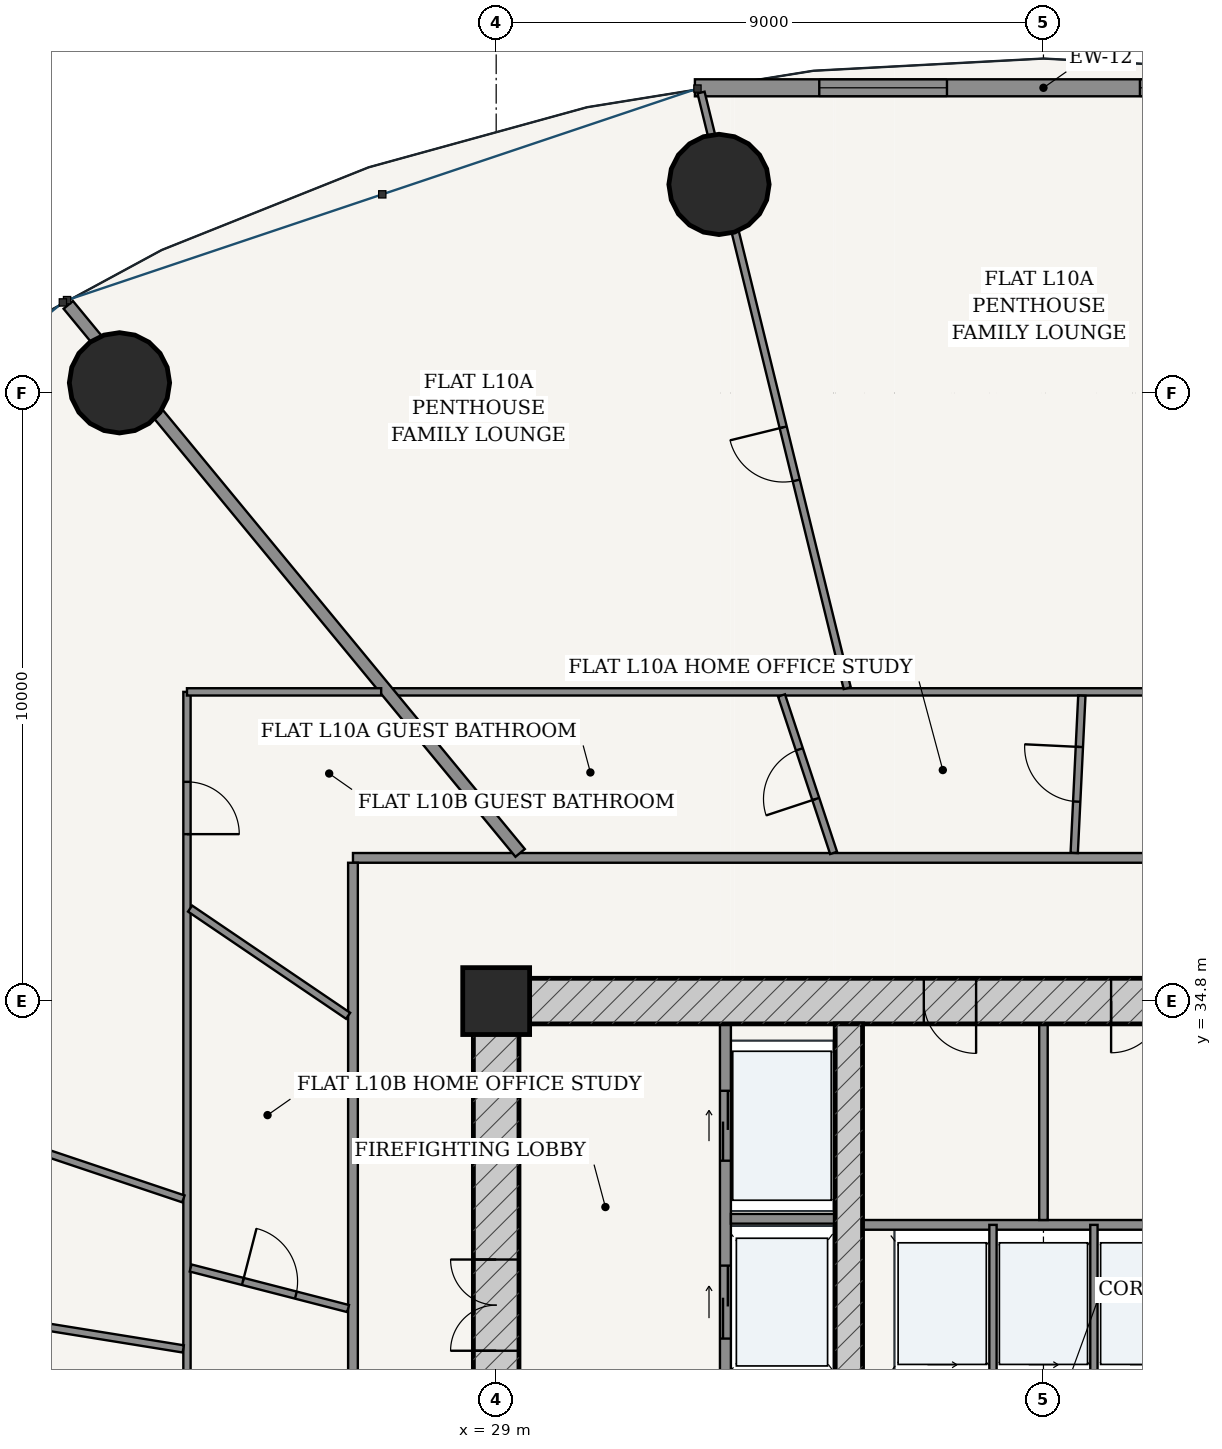
"""IFC4 building model, lengths in metres.
Left out: names, types, materials, properties, quantities, classifications, styles, units other than length and angle.
Written with IfcOpenShell. Run it as: python <this file> out.ifc"""

import sys

from ifc_helpers import new_model, si_unit, direction, frame, frame_2d, origin, origin_2d, place, context, subcontext, project, spatial, rectangle, hollow_circle, extrude, source, transform, mapped, element, fill, save


model = new_model("IFC4")
c1 = context("Model", 3, precision=1e-05, world=origin(), true_north=direction((-0.2419218956, 0.970295726276)))
c2 = subcontext(c1, "Body", "Model", "MODEL_VIEW")
j1 = project(units=[si_unit("LENGTHUNIT", "METRE"), si_unit("PLANEANGLEUNIT", "RADIAN")], contexts=[c1])
p1 = place(None, origin())
s1 = spatial("IfcSite", under=j1, at=p1, CompositionType="ELEMENT")
p2 = place(p1, origin())
s2 = spatial("IfcBuilding", under=s1, at=p2, CompositionType="ELEMENT")
p3 = place(p2, frame((0.0, 0.0, 42.0)))
s3 = spatial("IfcBuildingStorey", under=s2, at=p3, CompositionType="ELEMENT", Elevation=42.0)
p4 = place(p3, frame((29.0, 34.8, 0.0), z_axis=(0.0, 0.0, 1.0), x_axis=(1.0, 0.0, 0.0)))
e1 = element("IfcColumn", 1, at=p4, inside=s3, PredefinedType="COLUMN", context=c2, shape_type="SweptSolid", body=[
    extrude(rectangle(XDim=1.1, YDim=1.1, at=origin_2d()), origin(), (0.0, 0.0, 1.0), 3.6),
])
p5 = place(p3, frame((28.625, 34.8, 0.0), z_axis=(0.0, 0.0, 1.0), x_axis=(1.0, 0.0, 0.0)))
e2 = element("IfcWall", 2, at=p5, inside=s3, PredefinedType="SHEAR", context=c2, shape_type="SweptSolid", body=[
    extrude(rectangle(XDim=18.75, YDim=0.75, at=frame_2d((9.375, 0.0))), origin(), (0.0, 0.0, 1.0), 3.32),
])
p6 = place(p5, frame((7.407, 0.0, 0.0)))
e3 = element("IfcOpeningElement", 3, at=p6, cuts=e2, PredefinedType="OPENING", context=c2, shape_type="SweptSolid", body=[
    extrude(rectangle(XDim=0.86, YDim=2.1, at=frame_2d((0.43, 1.05))), frame((0.0, 0.385, 0.0), z_axis=(0.0, -1.0, 0.0), x_axis=(1.0, 0.0, 0.0)), (0.0, 0.0, 1.0), 0.77),
])
p7 = place(p5, frame((10.488, 0.0, 0.0)))
e4 = element("IfcOpeningElement", 4, at=p7, cuts=e2, PredefinedType="OPENING", context=c2, shape_type="SweptSolid", body=[
    extrude(rectangle(XDim=0.85, YDim=2.1, at=frame_2d((0.425, 1.05))), frame((0.0, 0.385, 0.0), z_axis=(0.0, -1.0, 0.0), x_axis=(1.0, 0.0, 0.0)), (0.0, 0.0, 1.0), 0.77),
])
p8 = place(p3, frame((29.0, 19.175, 0.0), z_axis=(0.0, 0.0, 1.0), x_axis=(0.0, 1.0, 0.0)))
e5 = element("IfcWall", 5, at=p8, inside=s3, PredefinedType="SHEAR", context=c2, shape_type="SweptSolid", body=[
    extrude(rectangle(XDim=15.25, YDim=0.75, at=frame_2d((7.625, 0.0))), origin(), (0.0, 0.0, 1.0), 3.32),
])
p9 = place(p8, frame((9.875, 0.0, 0.0)))
e6 = element("IfcOpeningElement", 6, at=p9, cuts=e5, PredefinedType="OPENING", context=c2, shape_type="SweptSolid", body=[
    extrude(rectangle(XDim=1.5, YDim=2.2, at=frame_2d((0.75, 1.1))), frame((0.0, 0.385, 0.0), z_axis=(0.0, -1.0, 0.0), x_axis=(1.0, 0.0, 0.0)), (0.0, 0.0, 1.0), 0.77),
])
p10 = place(p3, frame((34.8, 19.175, 0.0), z_axis=(0.0, 0.0, 1.0), x_axis=(0.0, 1.0, 0.0)))
e7 = element("IfcWall", 7, at=p10, inside=s3, PredefinedType="SHEAR", context=c2, shape_type="SweptSolid", body=[
    extrude(rectangle(XDim=15.25, YDim=0.45, at=frame_2d((7.625, 0.0))), origin(), (0.0, 0.0, 1.0), 3.32),
])
p11 = place(p10, frame((7.8, 0.0, 0.0)))
e8 = element("IfcOpeningElement", 8, at=p11, cuts=e7, PredefinedType="OPENING", context=c2, shape_type="SweptSolid", body=[
    extrude(rectangle(XDim=1.05, YDim=2.15, at=frame_2d((0.525, 1.075))), frame((0.0, 0.235, 0.0), z_axis=(0.0, -1.0, 0.0), x_axis=(1.0, 0.0, 0.0)), (0.0, 0.0, 1.0), 0.47),
])
for number, where, z_axis, x_axis in (
    (9, (32.664, 48.23, 0.0), (0.0, 0.0, 1.0), (1.0, 0.0, 0.0)),
    (10, (22.805, 44.968, 0.0), (0.0, 0.0, 1.0), (1.0, 0.0, 0.0)),
):
    element("IfcColumn", number, at=place(p3, frame(where, z_axis=z_axis, x_axis=x_axis)), inside=s3, PredefinedType="COLUMN", context=c2, shape_type="SweptSolid", body=[
        extrude(hollow_circle(Radius=0.825, WallThickness=0.05, at=origin_2d()), origin(), (0.0, 0.0, 1.0), 3.6),
    ])
p12 = place(p3, frame((43.732, 49.819, 0.0), z_axis=(0.0, 0.0, 1.0), x_axis=(-1.0, 0.0, 0.0)))
e11 = element("IfcWall", 11, at=p12, inside=s3, PredefinedType="SOLIDWALL", context=c2, shape_type="SweptSolid", body=[
    extrude(rectangle(XDim=11.463, YDim=0.28, at=frame_2d((5.732, 0.0))), origin(), (0.0, 0.0, 1.0), 3.32),
])
p13 = place(p12, frame((2.045, 0.0, 0.85)))
e12 = element("IfcOpeningElement", 12, at=p13, cuts=e11, PredefinedType="OPENING", context=c2, shape_type="SweptSolid", body=[
    extrude(rectangle(XDim=2.1, YDim=1.95, at=frame_2d((1.05, 0.975))), frame((0.0, 0.15, 0.0), z_axis=(0.0, -1.0, 0.0), x_axis=(1.0, 0.0, 0.0)), (0.0, 0.0, 1.0), 0.3),
])
p14 = place(p12, frame((7.318, 0.0, 0.85)))
e13 = element("IfcOpeningElement", 13, at=p14, cuts=e11, PredefinedType="OPENING", context=c2, shape_type="SweptSolid", body=[
    extrude(rectangle(XDim=2.1, YDim=1.95, at=frame_2d((1.05, 0.975))), frame((0.0, 0.15, 0.0), z_axis=(0.0, -1.0, 0.0), x_axis=(1.0, 0.0, 0.0)), (0.0, 0.0, 1.0), 0.3),
])
p15 = place(p3, frame((32.77, 28.52, 0.0), z_axis=(0.0, 0.0, 1.0), x_axis=(0.0, 1.0, 0.0)))
e14 = element("IfcWall", 14, at=p15, inside=s3, PredefinedType="PARTITIONING", context=c2, shape_type="SweptSolid", body=[
    extrude(rectangle(XDim=5.905, YDim=0.18, at=frame_2d((2.953, 0.0))), origin(), (0.0, 0.0, 1.0), 3.32),
])
p16 = place(p15, frame((3.655, 0.0, 0.0)))
e15 = element("IfcOpeningElement", 15, at=p16, cuts=e14, PredefinedType="OPENING", context=c2, shape_type="SweptSolid", body=[
    extrude(rectangle(XDim=1.15, YDim=2.2, at=frame_2d((0.575, 1.1))), frame((0.0, 0.1, 0.0), z_axis=(0.0, -1.0, 0.0), x_axis=(1.0, 0.0, 0.0)), (0.0, 0.0, 1.0), 0.2),
])
p17 = place(p15, frame((0.73, 0.0, 0.0)))
e16 = element("IfcOpeningElement", 16, at=p17, cuts=e14, PredefinedType="OPENING", context=c2, shape_type="SweptSolid", body=[
    extrude(rectangle(XDim=1.2, YDim=2.25, at=frame_2d((0.6, 1.125))), frame((0.0, 0.1, 0.0), z_axis=(0.0, -1.0, 0.0), x_axis=(1.0, 0.0, 0.0)), (0.0, 0.0, 1.0), 0.2),
])
p18 = place(p3, frame((32.86, 31.22, 0.0), z_axis=(0.0, 0.0, 1.0), x_axis=(1.0, 0.0, 0.0)))
e17 = element("IfcWall", 17, at=p18, inside=s3, PredefinedType="PARTITIONING", context=c2, shape_type="SweptSolid", body=[
    extrude(rectangle(XDim=1.715, YDim=0.16, at=frame_2d((0.857, 0.0))), origin(), (0.0, 0.0, 1.0), 3.32),
])
p19 = place(p3, frame((35.025, 31.12, 0.0), z_axis=(0.0, 0.0, 1.0), x_axis=(1.0, 0.0, 0.0)))
e18 = element("IfcWall", 18, at=p19, inside=s3, PredefinedType="PARTITIONING", context=c2, shape_type="SweptSolid", body=[
    extrude(rectangle(XDim=5.95, YDim=0.16, at=frame_2d((2.975, 0.0))), origin(), (0.0, 0.0, 1.0), 3.32),
])
for number, where, z_axis, x_axis in (
    (19, (37.17, 28.56, 0.0), (0.0, 0.0, 1.0), (0.0, 1.0, 0.0)),
    (20, (38.83, 28.56, 0.0), (0.0, 0.0, 1.0), (0.0, 1.0, 0.0)),
):
    element("IfcWall", number, at=place(p3, frame(where, z_axis=z_axis, x_axis=x_axis)), inside=s3, PredefinedType="PARTITIONING", context=c2, shape_type="SweptSolid", body=[
        extrude(rectangle(XDim=2.56, YDim=0.12, at=frame_2d((1.28, 0.0))), origin(), (0.0, 0.0, 1.0), 3.32),
    ])
p20 = place(p3, frame((38.0, 31.2, 0.0), z_axis=(0.0, 0.0, 1.0), x_axis=(0.0, 1.0, 0.0)))
e21 = element("IfcWall", 21, at=p20, inside=s3, PredefinedType="PARTITIONING", context=c2, shape_type="SweptSolid", body=[
    extrude(rectangle(XDim=3.225, YDim=0.14, at=frame_2d((1.613, 0.0))), origin(), (0.0, 0.0, 1.0), 3.32),
])
p21 = place(p3, frame((26.645, 37.155, 0.0), z_axis=(0.0, 0.0, 1.0), x_axis=(1.0, 0.0, 0.0)))
e22 = element("IfcWall", 22, at=p21, inside=s3, PredefinedType="PARTITIONING", context=c2, shape_type="SweptSolid", body=[
    extrude(rectangle(XDim=22.71, YDim=0.16, at=frame_2d((11.355, 0.0))), origin(), (0.0, 0.0, 1.0), 2.688),
])
p22 = place(p3, frame((26.645, 16.525, 0.0), z_axis=(0.0, 0.0, 1.0), x_axis=(0.0, 1.0, 0.0)))
e23 = element("IfcWall", 23, at=p22, inside=s3, PredefinedType="PARTITIONING", context=c2, shape_type="SweptSolid", body=[
    extrude(rectangle(XDim=20.55, YDim=0.16, at=frame_2d((10.275, 0.0))), origin(), (0.0, 0.0, 1.0), 2.688),
])
p23 = place(p22, frame((1.226, 0.0, 0.0)))
e24 = element("IfcOpeningElement", 24, at=p23, cuts=e23, PredefinedType="OPENING", context=c2, shape_type="SweptSolid", body=[
    extrude(rectangle(XDim=0.98, YDim=2.2, at=frame_2d((0.49, 1.1))), frame((0.0, 0.09, 0.0), z_axis=(0.0, -1.0, 0.0), x_axis=(1.0, 0.0, 0.0)), (0.0, 0.0, 1.0), 0.18),
])
p24 = place(p3, frame((27.312, 39.885, 0.0), z_axis=(0.0, 0.0, 1.0), x_axis=(1.0, 0.0, 0.0)))
e25 = element("IfcWall", 25, at=p24, inside=s3, PredefinedType="PARTITIONING", context=c2, shape_type="SweptSolid", body=[
    extrude(rectangle(XDim=24.772, YDim=0.12, at=frame_2d((12.386, 0.0))), origin(), (0.0, 0.0, 1.0), 2.688),
])
p25 = place(p3, frame((34.773, 39.945, 0.0), z_axis=(0.0, 0.0, 1.0), x_axis=(-0.238375747469, 0.97117300365, 0.0)))
e26 = element("IfcWall", 26, at=p25, inside=s3, PredefinedType="PARTITIONING", context=c2, shape_type="SweptSolid", body=[
    extrude(rectangle(XDim=10.086, YDim=0.12, at=frame_2d((5.043, 0.0))), origin(), (0.0, 0.0, 1.0), 2.688),
])
p26 = place(p25, frame((3.518, 0.0, 0.0)))
e27 = element("IfcOpeningElement", 27, at=p26, cuts=e26, PredefinedType="OPENING", context=c2, shape_type="SweptSolid", body=[
    extrude(rectangle(XDim=0.9, YDim=2.15, at=frame_2d((0.45, 1.075))), frame((0.0, 0.07, 0.0), z_axis=(0.0, -1.0, 0.0), x_axis=(1.0, 0.0, 0.0)), (0.0, 0.0, 1.0), 0.14),
])
p27 = place(p3, frame((38.506, 37.237, 0.0), z_axis=(0.0, 0.0, 1.0), x_axis=(0.048376073987, 0.998829192338, 0.0)))
e28 = element("IfcWall", 28, at=p27, inside=s3, PredefinedType="PARTITIONING", context=c2, shape_type="SweptSolid", body=[
    extrude(rectangle(XDim=2.589, YDim=0.12, at=frame_2d((1.294, 0.0))), origin(), (0.0, 0.0, 1.0), 3.32),
])
p28 = place(p27, frame((0.844, 0.0, 0.0)))
e29 = element("IfcOpeningElement", 29, at=p28, cuts=e28, PredefinedType="OPENING", context=c2, shape_type="SweptSolid", body=[
    extrude(rectangle(XDim=0.9, YDim=2.15, at=frame_2d((0.45, 1.075))), frame((0.0, 0.07, 0.0), z_axis=(0.0, -1.0, 0.0), x_axis=(1.0, 0.0, 0.0)), (0.0, 0.0, 1.0), 0.14),
])
p29 = place(p3, frame((34.549, 37.237, 0.0), z_axis=(0.0, 0.0, 1.0), x_axis=(-0.313863409377, 0.949468145992, 0.0)))
e30 = element("IfcWall", 30, at=p29, inside=s3, PredefinedType="PARTITIONING", context=c2, shape_type="SweptSolid", body=[
    extrude(rectangle(XDim=2.727, YDim=0.12, at=frame_2d((1.364, 0.0))), origin(), (0.0, 0.0, 1.0), 3.32),
])
p30 = place(p29, frame((0.934, 0.0, 0.0)))
e31 = element("IfcOpeningElement", 31, at=p30, cuts=e30, PredefinedType="OPENING", context=c2, shape_type="SweptSolid", body=[
    extrude(rectangle(XDim=0.86, YDim=2.15, at=frame_2d((0.43, 1.075))), frame((0.0, 0.07, 0.0), z_axis=(0.0, -1.0, 0.0), x_axis=(1.0, 0.0, 0.0)), (0.0, 0.0, 1.0), 0.14),
])
p31 = place(p3, frame((29.395, 37.237, 0.0), z_axis=(0.0, 0.0, 1.0), x_axis=(-0.636195770442, 0.77152766747, 0.0)))
e32 = element("IfcWall", 32, at=p31, inside=s3, PredefinedType="PARTITIONING", context=c2, shape_type="SweptSolid", body=[
    extrude(rectangle(XDim=11.681, YDim=0.2, at=frame_2d((5.84, 0.0))), origin(), (0.0, 0.0, 1.0), 2.688),
])
p32 = place(p3, frame((23.915, 13.715, 0.0), z_axis=(0.0, 0.0, 1.0), x_axis=(0.0, 1.0, 0.0)))
e33 = element("IfcWall", 33, at=p32, inside=s3, PredefinedType="PARTITIONING", context=c2, shape_type="SweptSolid", body=[
    extrude(rectangle(XDim=26.17, YDim=0.12, at=frame_2d((13.085, 0.0))), origin(), (0.0, 0.0, 1.0), 2.688),
])
p33 = place(p32, frame((1.895, 0.0, 0.0)))
e34 = element("IfcOpeningElement", 34, at=p33, cuts=e33, PredefinedType="OPENING", context=c2, shape_type="SweptSolid", body=[
    extrude(rectangle(XDim=0.9, YDim=2.15, at=frame_2d((0.45, 1.075))), frame((0.0, 0.07, 0.0), z_axis=(0.0, -1.0, 0.0), x_axis=(1.0, 0.0, 0.0)), (0.0, 0.0, 1.0), 0.14),
])
p34 = place(p32, frame((11.498, 0.0, 0.0)))
e35 = element("IfcOpeningElement", 35, at=p34, cuts=e33, PredefinedType="OPENING", context=c2, shape_type="SweptSolid", body=[
    extrude(rectangle(XDim=0.9, YDim=2.15, at=frame_2d((0.45, 1.075))), frame((0.0, 0.07, 0.0), z_axis=(0.0, -1.0, 0.0), x_axis=(1.0, 0.0, 0.0)), (0.0, 0.0, 1.0), 0.14),
])
p35 = place(p32, frame((23.831, 0.0, 0.0)))
e36 = element("IfcOpeningElement", 36, at=p35, cuts=e33, PredefinedType="OPENING", context=c2, shape_type="SweptSolid", body=[
    extrude(rectangle(XDim=0.86, YDim=2.15, at=frame_2d((0.43, 1.075))), frame((0.0, 0.07, 0.0), z_axis=(0.0, -1.0, 0.0), x_axis=(1.0, 0.0, 0.0)), (0.0, 0.0, 1.0), 0.14),
])
p36 = place(p3, frame((23.915, 39.885, 0.0), z_axis=(0.0, 0.0, 1.0), x_axis=(1.0, 0.0, 0.0)))
e37 = element("IfcWall", 37, at=p36, inside=s3, PredefinedType="PARTITIONING", context=c2, shape_type="SweptSolid", body=[
    extrude(rectangle(XDim=3.194, YDim=0.12, at=frame_2d((1.597, 0.0))), origin(), (0.0, 0.0, 1.0), 2.688),
])
p37 = place(p3, frame((23.856, 31.547, 0.0), z_axis=(0.0, 0.0, 1.0), x_axis=(-0.948017487737, 0.318218231634, 0.0)))
e38 = element("IfcWall", 38, at=p37, inside=s3, PredefinedType="PARTITIONING", context=c2, shape_type="SweptSolid", body=[
    extrude(rectangle(XDim=13.279, YDim=0.12, at=frame_2d((6.639, 0.0))), origin(), (0.0, 0.0, 1.0), 2.762),
])
p38 = place(p37, frame((6.189, 0.0, 0.0)))
e39 = element("IfcOpeningElement", 39, at=p38, cuts=e38, PredefinedType="OPENING", context=c2, shape_type="SweptSolid", body=[
    extrude(rectangle(XDim=0.9, YDim=2.15, at=frame_2d((0.45, 1.075))), frame((0.0, 0.07, 0.0), z_axis=(0.0, -1.0, 0.0), x_axis=(1.0, 0.0, 0.0)), (0.0, 0.0, 1.0), 0.14),
])
p39 = place(p3, frame((23.854, 29.08, 0.0), z_axis=(0.0, 0.0, 1.0), x_axis=(-0.987255773689, 0.159141563768, 0.0)))
e40 = element("IfcWall", 40, at=p39, inside=s3, PredefinedType="PARTITIONING", context=c2, shape_type="SweptSolid", body=[
    extrude(rectangle(XDim=14.359, YDim=0.12, at=frame_2d((7.18, 0.0))), origin(), (0.0, 0.0, 1.0), 2.688),
])
p40 = place(p39, frame((5.66, 0.0, 0.0)))
e41 = element("IfcOpeningElement", 41, at=p40, cuts=e40, PredefinedType="OPENING", context=c2, shape_type="SweptSolid", body=[
    extrude(rectangle(XDim=0.9, YDim=2.15, at=frame_2d((0.45, 1.075))), frame((0.0, 0.07, 0.0), z_axis=(0.0, -1.0, 0.0), x_axis=(1.0, 0.0, 0.0)), (0.0, 0.0, 1.0), 0.14),
])
p41 = place(p3, frame((26.565, 34.558, 0.0), z_axis=(0.0, 0.0, 1.0), x_axis=(-0.827501574847, 0.561463394734, 0.0)))
e42 = element("IfcWall", 42, at=p41, inside=s3, PredefinedType="PARTITIONING", context=c2, shape_type="SweptSolid", body=[
    extrude(rectangle(XDim=3.14, YDim=0.12, at=frame_2d((1.57, 0.0))), origin(), (0.0, 0.0, 1.0), 3.32),
])
p42 = place(p3, frame((26.565, 29.744, 0.0), z_axis=(0.0, 0.0, 1.0), x_axis=(-0.968421803088, 0.249317490972, 0.0)))
e43 = element("IfcWall", 43, at=p42, inside=s3, PredefinedType="PARTITIONING", context=c2, shape_type="SweptSolid", body=[
    extrude(rectangle(XDim=2.674, YDim=0.12, at=frame_2d((1.337, 0.0))), origin(), (0.0, 0.0, 1.0), 3.32),
])
p43 = place(p42, frame((0.887, 0.0, 0.0)))
e44 = element("IfcOpeningElement", 44, at=p43, cuts=e43, PredefinedType="OPENING", context=c2, shape_type="SweptSolid", body=[
    extrude(rectangle(XDim=0.9, YDim=2.15, at=frame_2d((0.45, 1.075))), frame((0.0, 0.07, 0.0), z_axis=(0.0, -1.0, 0.0), x_axis=(1.0, 0.0, 0.0)), (0.0, 0.0, 1.0), 0.14),
])
m1 = source(origin(), c2, "Body", "SweptSolid", [
    extrude(rectangle(XDim=2.1, YDim=1.95, at=frame_2d((1.05, 0.975))), frame((0.0, 0.03, 0.0), z_axis=(0.0, -1.0, 0.0), x_axis=(1.0, 0.0, 0.0)), (0.0, 0.0, 1.0), 0.06),
])
p44 = place(p13, origin())
e45 = element("IfcWindow", 45, at=p44, inside=s3, PartitioningType="SINGLE_PANEL", PredefinedType="WINDOW", context=c2, shape_type="MappedRepresentation", body=[
    mapped(m1, transform((0.0, 0.0, 0.0), scale=1.0)),
])
fill(e12, e45)
p45 = place(p14, origin())
e46 = element("IfcWindow", 46, at=p45, inside=s3, PartitioningType="SINGLE_PANEL", PredefinedType="WINDOW", context=c2, shape_type="MappedRepresentation", body=[
    mapped(m1, transform((0.0, 0.0, 0.0), scale=1.0)),
])
fill(e13, e46)
m2 = source(origin(), c2, "Body", "SweptSolid", [
    extrude(rectangle(XDim=1.5, YDim=2.2, at=frame_2d((0.75, 1.1))), frame((0.0, 0.025, 0.0), z_axis=(0.0, -1.0, 0.0), x_axis=(1.0, 0.0, 0.0)), (0.0, 0.0, 1.0), 0.05),
])
p46 = place(p9, origin())
e47 = element("IfcDoor", 47, at=p46, inside=s3, OperationType="DOUBLE_DOOR_SINGLE_SWING", PredefinedType="DOOR", context=c2, shape_type="MappedRepresentation", body=[
    mapped(m2, transform((0.0, 0.0, 0.0), scale=1.0)),
])
fill(e6, e47)
m3 = source(origin(), c2, "Body", "SweptSolid", [
    extrude(rectangle(XDim=0.86, YDim=2.1, at=frame_2d((0.43, 1.05))), frame((0.0, 0.025, 0.0), z_axis=(0.0, -1.0, 0.0), x_axis=(1.0, 0.0, 0.0)), (0.0, 0.0, 1.0), 0.05),
])
p47 = place(p6, frame((0.86, 0.0, 0.0), z_axis=(0.0, 0.0, 1.0), x_axis=(-1.0, 0.0, 0.0)))
e48 = element("IfcDoor", 48, at=p47, inside=s3, OperationType="SINGLE_SWING_LEFT", PredefinedType="DOOR", context=c2, shape_type="MappedRepresentation", body=[
    mapped(m3, transform((0.0, 0.0, 0.0), scale=1.0)),
])
fill(e3, e48)
m4 = source(origin(), c2, "Body", "SweptSolid", [
    extrude(rectangle(XDim=0.85, YDim=2.1, at=frame_2d((0.425, 1.05))), frame((0.0, 0.025, 0.0), z_axis=(0.0, -1.0, 0.0), x_axis=(1.0, 0.0, 0.0)), (0.0, 0.0, 1.0), 0.05),
])
p48 = place(p7, frame((0.85, 0.0, 0.0), z_axis=(0.0, 0.0, 1.0), x_axis=(-1.0, 0.0, 0.0)))
e49 = element("IfcDoor", 49, at=p48, inside=s3, OperationType="SINGLE_SWING_RIGHT", PredefinedType="DOOR", context=c2, shape_type="MappedRepresentation", body=[
    mapped(m4, transform((0.0, 0.0, 0.0), scale=1.0)),
])
fill(e4, e49)
m5 = source(origin(), c2, "Body", "SweptSolid", [
    extrude(rectangle(XDim=1.15, YDim=2.2, at=frame_2d((0.575, 1.1))), frame((0.0, 0.025, 0.0), z_axis=(0.0, -1.0, 0.0), x_axis=(1.0, 0.0, 0.0)), (0.0, 0.0, 1.0), 0.05),
])
p49 = place(p16, origin())
e50 = element("IfcDoor", 50, at=p49, inside=s3, OperationType="DOUBLE_DOOR_SLIDING", PredefinedType="DOOR", context=c2, shape_type="MappedRepresentation", body=[
    mapped(m5, transform((0.0, 0.0, 0.0), scale=1.0)),
])
fill(e15, e50)
m6 = source(origin(), c2, "Body", "SweptSolid", [
    extrude(rectangle(XDim=1.2, YDim=2.25, at=frame_2d((0.6, 1.125))), frame((0.0, 0.025, 0.0), z_axis=(0.0, -1.0, 0.0), x_axis=(1.0, 0.0, 0.0)), (0.0, 0.0, 1.0), 0.05),
])
p50 = place(p17, origin())
e51 = element("IfcDoor", 51, at=p50, inside=s3, OperationType="DOUBLE_DOOR_SLIDING", PredefinedType="DOOR", context=c2, shape_type="MappedRepresentation", body=[
    mapped(m6, transform((0.0, 0.0, 0.0), scale=1.0)),
])
fill(e16, e51)
m7 = source(origin(), c2, "Body", "SweptSolid", [
    extrude(rectangle(XDim=0.9, YDim=2.15, at=frame_2d((0.45, 1.075))), frame((0.0, 0.025, 0.0), z_axis=(0.0, -1.0, 0.0), x_axis=(1.0, 0.0, 0.0)), (0.0, 0.0, 1.0), 0.05),
])
p51 = place(p28, origin())
e52 = element("IfcDoor", 52, at=p51, inside=s3, OperationType="SINGLE_SWING_RIGHT", PredefinedType="DOOR", context=c2, shape_type="MappedRepresentation", body=[
    mapped(m7, transform((0.0, 0.0, 0.0), scale=1.0)),
])
fill(e29, e52)
m8 = source(origin(), c2, "Body", "SweptSolid", [
    extrude(rectangle(XDim=0.86, YDim=2.15, at=frame_2d((0.43, 1.075))), frame((0.0, 0.025, 0.0), z_axis=(0.0, -1.0, 0.0), x_axis=(1.0, 0.0, 0.0)), (0.0, 0.0, 1.0), 0.05),
])
p52 = place(p30, origin())
e53 = element("IfcDoor", 53, at=p52, inside=s3, OperationType="SINGLE_SWING_LEFT", PredefinedType="DOOR", context=c2, shape_type="MappedRepresentation", body=[
    mapped(m8, transform((0.0, 0.0, 0.0), scale=1.0)),
])
fill(e31, e53)
p53 = place(p26, origin())
e54 = element("IfcDoor", 54, at=p53, inside=s3, OperationType="SINGLE_SWING_RIGHT", PredefinedType="DOOR", context=c2, shape_type="MappedRepresentation", body=[
    mapped(m7, transform((0.0, 0.0, 0.0), scale=1.0)),
])
fill(e27, e54)
p54 = place(p43, frame((0.9, 0.0, 0.0), z_axis=(0.0, 0.0, 1.0), x_axis=(-1.0, 0.0, 0.0)))
e55 = element("IfcDoor", 55, at=p54, inside=s3, OperationType="SINGLE_SWING_LEFT", PredefinedType="DOOR", context=c2, shape_type="MappedRepresentation", body=[
    mapped(m7, transform((0.0, 0.0, 0.0), scale=1.0)),
])
fill(e44, e55)
p55 = place(p35, frame((0.86, 0.0, 0.0), z_axis=(0.0, 0.0, 1.0), x_axis=(-1.0, 0.0, 0.0)))
e56 = element("IfcDoor", 56, at=p55, inside=s3, OperationType="SINGLE_SWING_RIGHT", PredefinedType="DOOR", context=c2, shape_type="MappedRepresentation", body=[
    mapped(m8, transform((0.0, 0.0, 0.0), scale=1.0)),
])
fill(e36, e56)
save(model, sys.argv[1])
